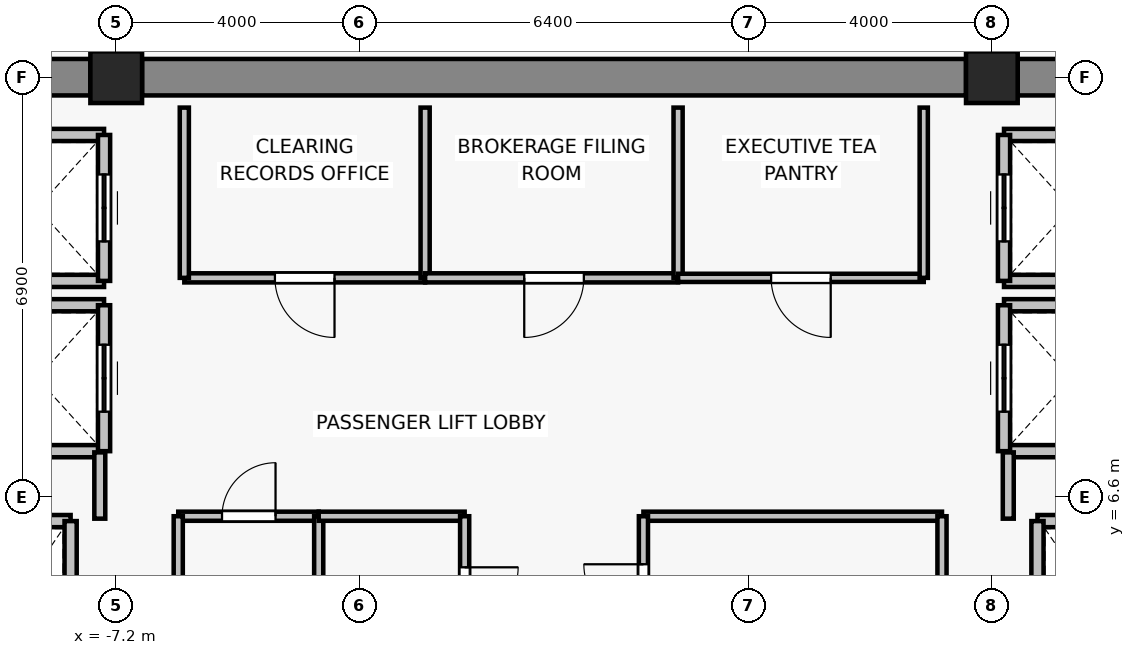
"""IFC4 building model, lengths in metres.
Left out: names, types, materials, properties, quantities, classifications, styles, units other than length and angle.
Written with IfcOpenShell. Run it as: python <this file> out.ifc"""

import sys

from ifc_helpers import new_model, si_unit, direction, frame, frame_2d, origin, origin_2d, place, context, subcontext, project, spatial, rectangle, extrude, source, transform, mapped, element, fill, save


model = new_model("IFC4")
c1 = context("Model", 3, precision=1e-05, world=origin(), true_north=direction((0.0, 1.0)))
c2 = subcontext(c1, "Body", "Model", "MODEL_VIEW")
j1 = project(units=[si_unit("LENGTHUNIT", "METRE"), si_unit("PLANEANGLEUNIT", "RADIAN")], contexts=[c1])
p1 = place(None, origin())
s1 = spatial("IfcSite", under=j1, at=p1, CompositionType="ELEMENT")
p2 = place(p1, origin())
s2 = spatial("IfcBuilding", under=s1, at=p2, CompositionType="ELEMENT")
p3 = place(p2, frame((0.0, 0.0, 248.5)))
s3 = spatial("IfcBuildingStorey", under=s2, at=p3, CompositionType="ELEMENT", Elevation=248.5)
for number, where, z_axis, x_axis in (
    (1, (-7.2, 13.5, 0.0), (0.0, 0.0, 1.0), (1.0, 0.0, 0.0)),
    (2, (7.2, 13.5, 0.0), (0.0, 0.0, 1.0), (1.0, 0.0, 0.0)),
):
    element("IfcColumn", number, at=place(p3, frame(where, z_axis=z_axis, x_axis=x_axis)), inside=s3, PredefinedType="COLUMN", context=c2, shape_type="SweptSolid", body=[
        extrude(rectangle(XDim=0.85, YDim=0.85, at=origin_2d()), origin(), (0.0, 0.0, 1.0), 3.3),
    ])
p4 = place(p3, frame((-13.975, 13.5, 0.0), z_axis=(0.0, 0.0, 1.0), x_axis=(1.0, 0.0, 0.0)))
e3 = element("IfcWall", 3, at=p4, inside=s3, PredefinedType="SHEAR", context=c2, shape_type="SweptSolid", body=[
    extrude(rectangle(XDim=6.35, YDim=0.6, at=frame_2d((3.175, 0.0))), origin(), (0.0, 0.0, 1.0), 3.075),
])
p5 = place(p3, frame((-6.775, 13.5, 0.0), z_axis=(0.0, 0.0, 1.0), x_axis=(1.0, 0.0, 0.0)))
e4 = element("IfcWall", 4, at=p5, inside=s3, PredefinedType="SHEAR", context=c2, shape_type="SweptSolid", body=[
    extrude(rectangle(XDim=13.55, YDim=0.6, at=frame_2d((6.775, 0.0))), origin(), (0.0, 0.0, 1.0), 3.075),
])
p6 = place(p3, frame((7.625, 13.5, 0.0), z_axis=(0.0, 0.0, 1.0), x_axis=(1.0, 0.0, 0.0)))
e5 = element("IfcWall", 5, at=p6, inside=s3, PredefinedType="SHEAR", context=c2, shape_type="SweptSolid", body=[
    extrude(rectangle(XDim=6.35, YDim=0.6, at=frame_2d((3.175, 0.0))), origin(), (0.0, 0.0, 1.0), 3.075),
])
p7 = place(p3, frame((-9.95, 6.2, 0.0), z_axis=(0.0, 0.0, 1.0), x_axis=(1.0, 0.0, 0.0)))
e6 = element("IfcWall", 6, at=p7, inside=s3, PredefinedType="SOLIDWALL", context=c2, shape_type="SweptSolid", body=[
    extrude(rectangle(XDim=2.0, YDim=0.2, at=frame_2d((1.0, 0.0))), origin(), (0.0, 0.0, 1.0), 3.075),
])
p8 = place(p3, frame((-7.95, 6.2, 0.0), z_axis=(0.0, 0.0, 1.0), x_axis=(0.0, -1.0, 0.0)))
e7 = element("IfcWall", 7, at=p8, inside=s3, PredefinedType="SOLIDWALL", context=c2, shape_type="SweptSolid", body=[
    extrude(rectangle(XDim=2.8, YDim=0.2, at=frame_2d((1.4, 0.0))), origin(), (0.0, 0.0, 1.0), 3.075),
])
p9 = place(p3, frame((7.95, 6.2, 0.0), z_axis=(0.0, 0.0, 1.0), x_axis=(1.0, 0.0, 0.0)))
e8 = element("IfcWall", 8, at=p9, inside=s3, PredefinedType="SOLIDWALL", context=c2, shape_type="SweptSolid", body=[
    extrude(rectangle(XDim=2.0, YDim=0.2, at=frame_2d((1.0, 0.0))), origin(), (0.0, 0.0, 1.0), 3.075),
])
p10 = place(p3, frame((7.95, 3.4, 0.0), z_axis=(0.0, 0.0, 1.0), x_axis=(0.0, 1.0, 0.0)))
e9 = element("IfcWall", 9, at=p10, inside=s3, PredefinedType="SOLIDWALL", context=c2, shape_type="SweptSolid", body=[
    extrude(rectangle(XDim=2.8, YDim=0.2, at=frame_2d((1.4, 0.0))), origin(), (0.0, 0.0, 1.0), 3.075),
])
for number, where, z_axis, x_axis in (
    (10, (-7.4, 7.35, 0.0), (0.0, 0.0, 1.0), (-1.0, 0.0, 0.0)),
    (11, (-9.6, 9.75, 0.0), (0.0, 0.0, 1.0), (1.0, 0.0, 0.0)),
):
    element("IfcWall", number, at=place(p3, frame(where, z_axis=z_axis, x_axis=x_axis)), inside=s3, PredefinedType="SOLIDWALL", context=c2, shape_type="SweptSolid", body=[
        extrude(rectangle(XDim=2.2, YDim=0.2, at=frame_2d((1.1, 0.0))), origin(), (0.0, 0.0, 1.0), 2.615),
    ])
p11 = place(p3, frame((-7.4, 9.75, 0.0), z_axis=(0.0, 0.0, 1.0), x_axis=(0.0, -1.0, 0.0)))
e12 = element("IfcWall", 12, at=p11, inside=s3, PredefinedType="SOLIDWALL", context=c2, shape_type="SweptSolid", body=[
    extrude(rectangle(XDim=2.4, YDim=0.2, at=frame_2d((1.2, 0.0))), origin(), (0.0, 0.0, 1.0), 2.615),
])
p12 = place(p11, frame((0.65, 0.0, 0.0)))
e13 = element("IfcOpeningElement", 13, at=p12, cuts=e12, PredefinedType="OPENING", context=c2, shape_type="SweptSolid", body=[
    extrude(rectangle(XDim=1.1, YDim=2.2, at=frame_2d((0.55, 1.1))), frame((0.0, 0.11, 0.0), z_axis=(0.0, -1.0, 0.0), x_axis=(1.0, 0.0, 0.0)), (0.0, 0.0, 1.0), 0.22),
])
for number, where, z_axis, x_axis in (
    (14, (-7.4, 10.15, 0.0), (0.0, 0.0, 1.0), (-1.0, 0.0, 0.0)),
    (15, (-9.6, 12.55, 0.0), (0.0, 0.0, 1.0), (1.0, 0.0, 0.0)),
):
    element("IfcWall", number, at=place(p3, frame(where, z_axis=z_axis, x_axis=x_axis)), inside=s3, PredefinedType="SOLIDWALL", context=c2, shape_type="SweptSolid", body=[
        extrude(rectangle(XDim=2.2, YDim=0.2, at=frame_2d((1.1, 0.0))), origin(), (0.0, 0.0, 1.0), 2.615),
    ])
p13 = place(p3, frame((-7.4, 12.55, 0.0), z_axis=(0.0, 0.0, 1.0), x_axis=(0.0, -1.0, 0.0)))
e16 = element("IfcWall", 16, at=p13, inside=s3, PredefinedType="SOLIDWALL", context=c2, shape_type="SweptSolid", body=[
    extrude(rectangle(XDim=2.4, YDim=0.2, at=frame_2d((1.2, 0.0))), origin(), (0.0, 0.0, 1.0), 2.615),
])
p14 = place(p13, frame((0.65, 0.0, 0.0)))
e17 = element("IfcOpeningElement", 17, at=p14, cuts=e16, PredefinedType="OPENING", context=c2, shape_type="SweptSolid", body=[
    extrude(rectangle(XDim=1.1, YDim=2.2, at=frame_2d((0.55, 1.1))), frame((0.0, 0.11, 0.0), z_axis=(0.0, -1.0, 0.0), x_axis=(1.0, 0.0, 0.0)), (0.0, 0.0, 1.0), 0.22),
])
for number, where, z_axis, x_axis in (
    (18, (9.6, 7.35, 0.0), (0.0, 0.0, 1.0), (-1.0, 0.0, 0.0)),
    (19, (7.4, 9.75, 0.0), (0.0, 0.0, 1.0), (1.0, 0.0, 0.0)),
):
    element("IfcWall", number, at=place(p3, frame(where, z_axis=z_axis, x_axis=x_axis)), inside=s3, PredefinedType="SOLIDWALL", context=c2, shape_type="SweptSolid", body=[
        extrude(rectangle(XDim=2.2, YDim=0.2, at=frame_2d((1.1, 0.0))), origin(), (0.0, 0.0, 1.0), 2.615),
    ])
p15 = place(p3, frame((7.4, 7.35, 0.0), z_axis=(0.0, 0.0, 1.0), x_axis=(0.0, 1.0, 0.0)))
e20 = element("IfcWall", 20, at=p15, inside=s3, PredefinedType="SOLIDWALL", context=c2, shape_type="SweptSolid", body=[
    extrude(rectangle(XDim=2.4, YDim=0.2, at=frame_2d((1.2, 0.0))), origin(), (0.0, 0.0, 1.0), 2.615),
])
p16 = place(p15, frame((0.65, 0.0, 0.0)))
e21 = element("IfcOpeningElement", 21, at=p16, cuts=e20, PredefinedType="OPENING", context=c2, shape_type="SweptSolid", body=[
    extrude(rectangle(XDim=1.1, YDim=2.2, at=frame_2d((0.55, 1.1))), frame((0.0, 0.11, 0.0), z_axis=(0.0, -1.0, 0.0), x_axis=(1.0, 0.0, 0.0)), (0.0, 0.0, 1.0), 0.22),
])
for number, where, z_axis, x_axis in (
    (22, (9.6, 10.15, 0.0), (0.0, 0.0, 1.0), (-1.0, 0.0, 0.0)),
    (23, (7.4, 12.55, 0.0), (0.0, 0.0, 1.0), (1.0, 0.0, 0.0)),
):
    element("IfcWall", number, at=place(p3, frame(where, z_axis=z_axis, x_axis=x_axis)), inside=s3, PredefinedType="SOLIDWALL", context=c2, shape_type="SweptSolid", body=[
        extrude(rectangle(XDim=2.2, YDim=0.2, at=frame_2d((1.1, 0.0))), origin(), (0.0, 0.0, 1.0), 2.615),
    ])
p17 = place(p3, frame((7.4, 10.15, 0.0), z_axis=(0.0, 0.0, 1.0), x_axis=(0.0, 1.0, 0.0)))
e24 = element("IfcWall", 24, at=p17, inside=s3, PredefinedType="SOLIDWALL", context=c2, shape_type="SweptSolid", body=[
    extrude(rectangle(XDim=2.4, YDim=0.2, at=frame_2d((1.2, 0.0))), origin(), (0.0, 0.0, 1.0), 2.615),
])
p18 = place(p17, frame((0.65, 0.0, 0.0)))
e25 = element("IfcOpeningElement", 25, at=p18, cuts=e24, PredefinedType="OPENING", context=c2, shape_type="SweptSolid", body=[
    extrude(rectangle(XDim=1.1, YDim=2.2, at=frame_2d((0.55, 1.1))), frame((0.0, 0.11, 0.0), z_axis=(0.0, -1.0, 0.0), x_axis=(1.0, 0.0, 0.0)), (0.0, 0.0, 1.0), 0.22),
])
for number, where, z_axis, x_axis in (
    (26, (-7.47, 7.33, 0.0), (0.0, 0.0, 1.0), (0.0, -1.0, 0.0)),
    (27, (7.47, 6.24, 0.0), (0.0, 0.0, 1.0), (0.0, 1.0, 0.0)),
):
    element("IfcWall", number, at=place(p3, frame(where, z_axis=z_axis, x_axis=x_axis)), inside=s3, PredefinedType="PARTITIONING", context=c2, shape_type="SweptSolid", body=[
        extrude(rectangle(XDim=1.09, YDim=0.18, at=frame_2d((0.545, 0.0))), origin(), (0.0, 0.0, 1.0), 2.615),
    ])
p19 = place(p3, frame((-2.12, 10.2, 0.0), z_axis=(0.0, 0.0, 1.0), x_axis=(-1.0, 0.0, 0.0)))
e28 = element("IfcWall", 28, at=p19, inside=s3, PredefinedType="PARTITIONING", context=c2, shape_type="SweptSolid", body=[
    extrude(rectangle(XDim=3.96, YDim=0.15, at=frame_2d((1.98, 0.0))), origin(), (0.0, 0.0, 1.0), 3.075),
])
p20 = place(p19, frame((1.49, 0.0, 0.0)))
e29 = element("IfcOpeningElement", 29, at=p20, cuts=e28, PredefinedType="OPENING", context=c2, shape_type="SweptSolid", body=[
    extrude(rectangle(XDim=0.98, YDim=2.15, at=frame_2d((0.49, 1.075))), frame((0.0, 0.085, 0.0), z_axis=(0.0, -1.0, 0.0), x_axis=(1.0, 0.0, 0.0)), (0.0, 0.0, 1.0), 0.17),
])
for number, where, z_axis, x_axis in (
    (30, (-6.08, 10.2, 0.0), (0.0, 0.0, 1.0), (0.0, 1.0, 0.0)),
    (31, (-2.12, 13.0, 0.0), (0.0, 0.0, 1.0), (0.0, -1.0, 0.0)),
):
    element("IfcWall", number, at=place(p3, frame(where, z_axis=z_axis, x_axis=x_axis)), inside=s3, PredefinedType="PARTITIONING", context=c2, shape_type="SweptSolid", body=[
        extrude(rectangle(XDim=2.8, YDim=0.15, at=frame_2d((1.4, 0.0))), origin(), (0.0, 0.0, 1.0), 3.075),
    ])
p21 = place(p3, frame((2.04, 10.2, 0.0), z_axis=(0.0, 0.0, 1.0), x_axis=(-1.0, 0.0, 0.0)))
e32 = element("IfcWall", 32, at=p21, inside=s3, PredefinedType="PARTITIONING", context=c2, shape_type="SweptSolid", body=[
    extrude(rectangle(XDim=4.16, YDim=0.15, at=frame_2d((2.08, 0.0))), origin(), (0.0, 0.0, 1.0), 3.075),
])
p22 = place(p21, frame((1.55, 0.0, 0.0)))
e33 = element("IfcOpeningElement", 33, at=p22, cuts=e32, PredefinedType="OPENING", context=c2, shape_type="SweptSolid", body=[
    extrude(rectangle(XDim=0.98, YDim=2.15, at=frame_2d((0.49, 1.075))), frame((0.0, 0.085, 0.0), z_axis=(0.0, -1.0, 0.0), x_axis=(1.0, 0.0, 0.0)), (0.0, 0.0, 1.0), 0.17),
])
p23 = place(p3, frame((2.04, 13.0, 0.0), z_axis=(0.0, 0.0, 1.0), x_axis=(0.0, -1.0, 0.0)))
e34 = element("IfcWall", 34, at=p23, inside=s3, PredefinedType="PARTITIONING", context=c2, shape_type="SweptSolid", body=[
    extrude(rectangle(XDim=2.8, YDim=0.15, at=frame_2d((1.4, 0.0))), origin(), (0.0, 0.0, 1.0), 3.075),
])
p24 = place(p3, frame((6.08, 10.2, 0.0), z_axis=(0.0, 0.0, 1.0), x_axis=(-1.0, 0.0, 0.0)))
e35 = element("IfcWall", 35, at=p24, inside=s3, PredefinedType="PARTITIONING", context=c2, shape_type="SweptSolid", body=[
    extrude(rectangle(XDim=4.04, YDim=0.135, at=frame_2d((2.02, 0.0))), origin(), (0.0, 0.0, 1.0), 3.075),
])
p25 = place(p24, frame((1.53, 0.0, 0.0)))
e36 = element("IfcOpeningElement", 36, at=p25, cuts=e35, PredefinedType="OPENING", context=c2, shape_type="SweptSolid", body=[
    extrude(rectangle(XDim=0.98, YDim=2.15, at=frame_2d((0.49, 1.075))), frame((0.0, 0.077, 0.0), z_axis=(0.0, -1.0, 0.0), x_axis=(1.0, 0.0, 0.0)), (0.0, 0.0, 1.0), 0.155),
])
p26 = place(p3, frame((6.08, 13.0, 0.0), z_axis=(0.0, 0.0, 1.0), x_axis=(0.0, -1.0, 0.0)))
e37 = element("IfcWall", 37, at=p26, inside=s3, PredefinedType="PARTITIONING", context=c2, shape_type="SweptSolid", body=[
    extrude(rectangle(XDim=2.8, YDim=0.135, at=frame_2d((1.4, 0.0))), origin(), (0.0, 0.0, 1.0), 3.075),
])
p27 = place(p3, frame((-6.18, 6.28, 0.0), z_axis=(0.0, 0.0, 1.0), x_axis=(1.0, 0.0, 0.0)))
e38 = element("IfcWall", 38, at=p27, inside=s3, PredefinedType="PARTITIONING", context=c2, shape_type="SweptSolid", body=[
    extrude(rectangle(XDim=2.31, YDim=0.15, at=frame_2d((1.155, 0.0))), origin(), (0.0, 0.0, 1.0), 3.075),
])
p28 = place(p27, frame((0.72, 0.0, 0.0)))
e39 = element("IfcOpeningElement", 39, at=p28, cuts=e38, PredefinedType="OPENING", context=c2, shape_type="SweptSolid", body=[
    extrude(rectangle(XDim=0.88, YDim=2.1, at=frame_2d((0.44, 1.05))), frame((0.0, 0.085, 0.0), z_axis=(0.0, -1.0, 0.0), x_axis=(1.0, 0.0, 0.0)), (0.0, 0.0, 1.0), 0.17),
])
for number, where, z_axis, x_axis in (
    (40, (-6.18, 3.76, 0.0), (0.0, 0.0, 1.0), (0.0, 1.0, 0.0)),
    (41, (-3.87, 6.28, 0.0), (0.0, 0.0, 1.0), (0.0, -1.0, 0.0)),
):
    element("IfcWall", number, at=place(p3, frame(where, z_axis=z_axis, x_axis=x_axis)), inside=s3, PredefinedType="PARTITIONING", context=c2, shape_type="SweptSolid", body=[
        extrude(rectangle(XDim=2.52, YDim=0.15, at=frame_2d((1.26, 0.0))), origin(), (0.0, 0.0, 1.0), 3.075),
    ])
p29 = place(p3, frame((-3.87, 6.28, 0.0), z_axis=(0.0, 0.0, 1.0), x_axis=(1.0, 0.0, 0.0)))
e42 = element("IfcWall", 42, at=p29, inside=s3, PredefinedType="PARTITIONING", context=c2, shape_type="SweptSolid", body=[
    extrude(rectangle(XDim=2.4, YDim=0.15, at=frame_2d((1.2, 0.0))), origin(), (0.0, 0.0, 1.0), 3.075),
])
p30 = place(p3, frame((-1.47, 6.28, 0.0), z_axis=(0.0, 0.0, 1.0), x_axis=(0.0, -1.0, 0.0)))
e43 = element("IfcWall", 43, at=p30, inside=s3, PredefinedType="PARTITIONING", context=c2, shape_type="SweptSolid", body=[
    extrude(rectangle(XDim=2.52, YDim=0.15, at=frame_2d((1.26, 0.0))), origin(), (0.0, 0.0, 1.0), 3.075),
])
p31 = place(p30, frame((0.84, 0.0, 0.0)))
e44 = element("IfcOpeningElement", 44, at=p31, cuts=e43, PredefinedType="OPENING", context=c2, shape_type="SweptSolid", body=[
    extrude(rectangle(XDim=0.88, YDim=2.1, at=frame_2d((0.44, 1.05))), frame((0.0, 0.085, 0.0), z_axis=(0.0, -1.0, 0.0), x_axis=(1.0, 0.0, 0.0)), (0.0, 0.0, 1.0), 0.17),
])
p32 = place(p3, frame((1.47, 6.28, 0.0), z_axis=(0.0, 0.0, 1.0), x_axis=(1.0, 0.0, 0.0)))
e45 = element("IfcWall", 45, at=p32, inside=s3, PredefinedType="PARTITIONING", context=c2, shape_type="SweptSolid", body=[
    extrude(rectangle(XDim=4.91, YDim=0.15, at=frame_2d((2.455, 0.0))), origin(), (0.0, 0.0, 1.0), 3.075),
])
p33 = place(p3, frame((1.47, 3.76, 0.0), z_axis=(0.0, 0.0, 1.0), x_axis=(0.0, 1.0, 0.0)))
e46 = element("IfcWall", 46, at=p33, inside=s3, PredefinedType="PARTITIONING", context=c2, shape_type="SweptSolid", body=[
    extrude(rectangle(XDim=2.52, YDim=0.15, at=frame_2d((1.26, 0.0))), origin(), (0.0, 0.0, 1.0), 3.075),
])
p34 = place(p33, frame((0.75, 0.0, 0.0)))
e47 = element("IfcOpeningElement", 47, at=p34, cuts=e46, PredefinedType="OPENING", context=c2, shape_type="SweptSolid", body=[
    extrude(rectangle(XDim=0.98, YDim=2.15, at=frame_2d((0.49, 1.075))), frame((0.0, 0.085, 0.0), z_axis=(0.0, -1.0, 0.0), x_axis=(1.0, 0.0, 0.0)), (0.0, 0.0, 1.0), 0.17),
])
p35 = place(p3, frame((6.38, 6.28, 0.0), z_axis=(0.0, 0.0, 1.0), x_axis=(0.0, -1.0, 0.0)))
e48 = element("IfcWall", 48, at=p35, inside=s3, PredefinedType="PARTITIONING", context=c2, shape_type="SweptSolid", body=[
    extrude(rectangle(XDim=2.52, YDim=0.15, at=frame_2d((1.26, 0.0))), origin(), (0.0, 0.0, 1.0), 3.075),
])
m1 = source(origin(), c2, "Body", "SweptSolid", [
    extrude(rectangle(XDim=1.1, YDim=2.2, at=frame_2d((0.55, 1.1))), frame((0.0, 0.025, 0.0), z_axis=(0.0, -1.0, 0.0), x_axis=(1.0, 0.0, 0.0)), (0.0, 0.0, 1.0), 0.05),
])
p36 = place(p12, origin())
e49 = element("IfcDoor", 49, at=p36, inside=s3, OperationType="DOUBLE_DOOR_SLIDING", PredefinedType="DOOR", context=c2, shape_type="MappedRepresentation", body=[
    mapped(m1, transform((0.0, 0.0, 0.0), x_axis=(1.0, 0.0, 0.0), y_axis=(0.0, 1.0, 0.0), z_axis=(0.0, 0.0, 1.0), scale=1.0)),
])
fill(e13, e49)
p37 = place(p14, origin())
e50 = element("IfcDoor", 50, at=p37, inside=s3, OperationType="DOUBLE_DOOR_SLIDING", PredefinedType="DOOR", context=c2, shape_type="MappedRepresentation", body=[
    mapped(m1, transform((0.0, 0.0, 0.0), x_axis=(1.0, 0.0, 0.0), y_axis=(0.0, 1.0, 0.0), z_axis=(0.0, 0.0, 1.0), scale=1.0)),
])
fill(e17, e50)
p38 = place(p16, origin())
e51 = element("IfcDoor", 51, at=p38, inside=s3, OperationType="DOUBLE_DOOR_SLIDING", PredefinedType="DOOR", context=c2, shape_type="MappedRepresentation", body=[
    mapped(m1, transform((0.0, 0.0, 0.0), x_axis=(1.0, 0.0, 0.0), y_axis=(0.0, 1.0, 0.0), z_axis=(0.0, 0.0, 1.0), scale=1.0)),
])
fill(e21, e51)
p39 = place(p18, origin())
e52 = element("IfcDoor", 52, at=p39, inside=s3, OperationType="DOUBLE_DOOR_SLIDING", PredefinedType="DOOR", context=c2, shape_type="MappedRepresentation", body=[
    mapped(m1, transform((0.0, 0.0, 0.0), x_axis=(1.0, 0.0, 0.0), y_axis=(0.0, 1.0, 0.0), z_axis=(0.0, 0.0, 1.0), scale=1.0)),
])
fill(e25, e52)
m2 = source(origin(), c2, "Body", "SweptSolid", [
    extrude(rectangle(XDim=0.98, YDim=2.15, at=frame_2d((0.49, 1.075))), frame((0.0, 0.025, 0.0), z_axis=(0.0, -1.0, 0.0), x_axis=(1.0, 0.0, 0.0)), (0.0, 0.0, 1.0), 0.05),
])
p40 = place(p20, origin())
e53 = element("IfcDoor", 53, at=p40, inside=s3, OperationType="SINGLE_SWING_LEFT", PredefinedType="DOOR", context=c2, shape_type="MappedRepresentation", body=[
    mapped(m2, transform((0.0, 0.0, 0.0), x_axis=(1.0, 0.0, 0.0), y_axis=(0.0, 1.0, 0.0), z_axis=(0.0, 0.0, 1.0), scale=1.0)),
])
fill(e29, e53)
p41 = place(p22, origin())
e54 = element("IfcDoor", 54, at=p41, inside=s3, OperationType="SINGLE_SWING_RIGHT", PredefinedType="DOOR", context=c2, shape_type="MappedRepresentation", body=[
    mapped(m2, transform((0.0, 0.0, 0.0), x_axis=(1.0, 0.0, 0.0), y_axis=(0.0, 1.0, 0.0), z_axis=(0.0, 0.0, 1.0), scale=1.0)),
])
fill(e33, e54)
p42 = place(p25, origin())
e55 = element("IfcDoor", 55, at=p42, inside=s3, OperationType="SINGLE_SWING_LEFT", PredefinedType="DOOR", context=c2, shape_type="MappedRepresentation", body=[
    mapped(m2, transform((0.0, 0.0, 0.0), x_axis=(1.0, 0.0, 0.0), y_axis=(0.0, 1.0, 0.0), z_axis=(0.0, 0.0, 1.0), scale=1.0)),
])
fill(e36, e55)
m3 = source(origin(), c2, "Body", "SweptSolid", [
    extrude(rectangle(XDim=0.88, YDim=2.1, at=frame_2d((0.44, 1.05))), frame((0.0, 0.025, 0.0), z_axis=(0.0, -1.0, 0.0), x_axis=(1.0, 0.0, 0.0)), (0.0, 0.0, 1.0), 0.05),
])
p43 = place(p28, origin())
e56 = element("IfcDoor", 56, at=p43, inside=s3, OperationType="SINGLE_SWING_RIGHT", PredefinedType="DOOR", context=c2, shape_type="MappedRepresentation", body=[
    mapped(m3, transform((0.0, 0.0, 0.0), x_axis=(1.0, 0.0, 0.0), y_axis=(0.0, 1.0, 0.0), z_axis=(0.0, 0.0, 1.0), scale=1.0)),
])
fill(e39, e56)
p44 = place(p31, origin())
e57 = element("IfcDoor", 57, at=p44, inside=s3, OperationType="SINGLE_SWING_LEFT", PredefinedType="DOOR", context=c2, shape_type="MappedRepresentation", body=[
    mapped(m3, transform((0.0, 0.0, 0.0), x_axis=(1.0, 0.0, 0.0), y_axis=(0.0, 1.0, 0.0), z_axis=(0.0, 0.0, 1.0), scale=1.0)),
])
fill(e44, e57)
p45 = place(p34, origin())
e58 = element("IfcDoor", 58, at=p45, inside=s3, OperationType="SINGLE_SWING_RIGHT", PredefinedType="DOOR", context=c2, shape_type="MappedRepresentation", body=[
    mapped(m2, transform((0.0, 0.0, 0.0), x_axis=(1.0, 0.0, 0.0), y_axis=(0.0, 1.0, 0.0), z_axis=(0.0, 0.0, 1.0), scale=1.0)),
])
fill(e47, e58)
save(model, sys.argv[1])
